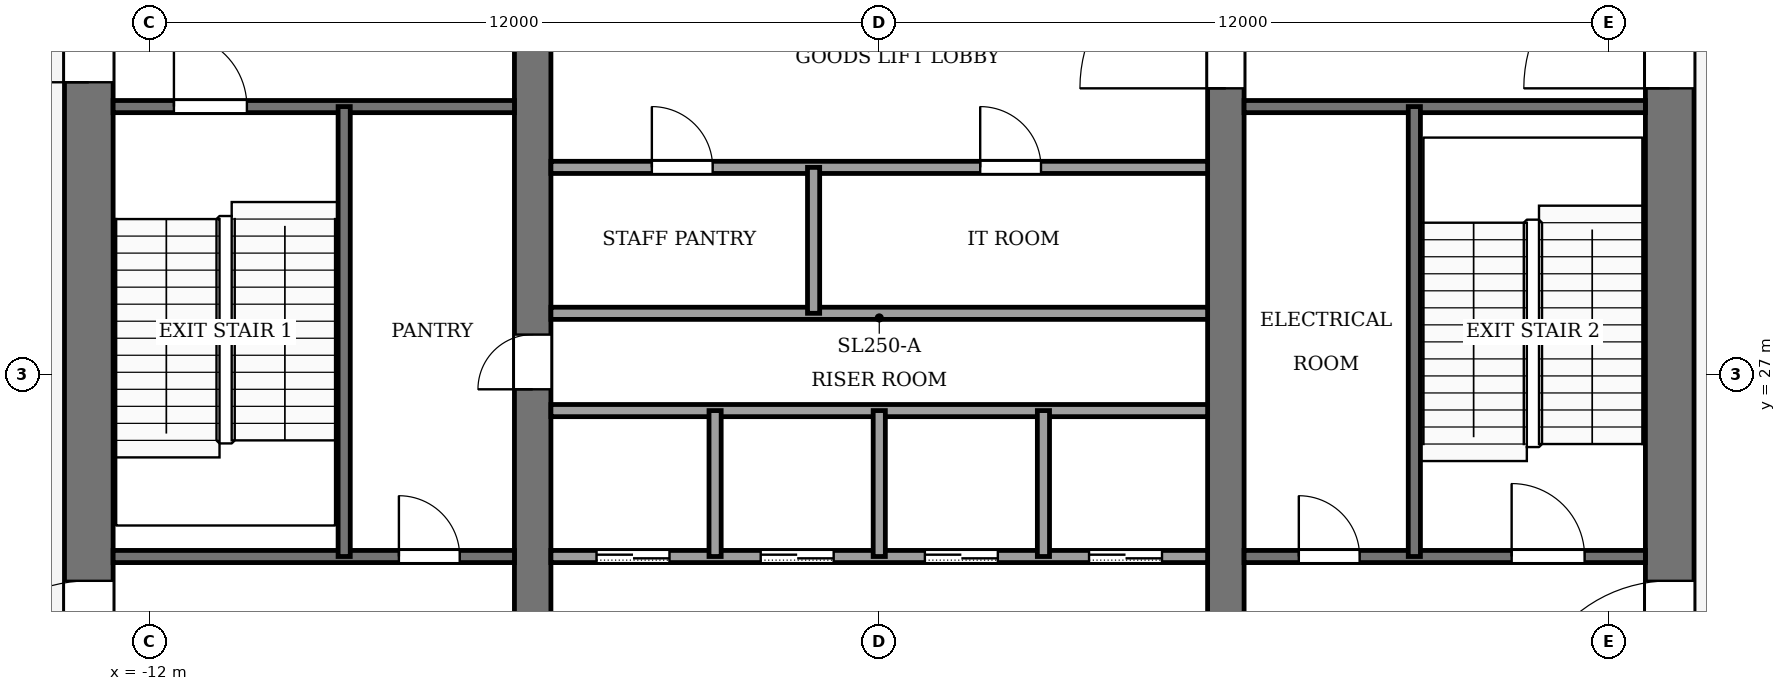
"""IFC4 building model, lengths in metres.
Left out: names, types, materials, properties, quantities, classifications, styles, units other than length and angle.
Written with IfcOpenShell. Run it as: python <this file> out.ifc"""

import sys

from ifc_helpers import new_model, si_unit, direction, frame, frame_2d, origin, place, context, subcontext, project, spatial, rectangle, extrude, element, fill, save


model = new_model("IFC4")
c1 = context("Model", 3, precision=1e-05, world=origin(), true_north=direction((0.0, 1.0)))
c2 = subcontext(c1, "Body", "Model", "MODEL_VIEW")
j1 = project(units=[si_unit("LENGTHUNIT", "METRE"), si_unit("PLANEANGLEUNIT", "RADIAN")], contexts=[c1])
p1 = place(None, origin())
s1 = spatial("IfcSite", under=j1, at=p1, CompositionType="ELEMENT")
p2 = place(p1, origin())
s2 = spatial("IfcBuilding", under=s1, at=p2, CompositionType="ELEMENT")
p3 = place(p2, frame((0.0, 0.0, 233.0)))
s3 = spatial("IfcBuildingStorey", under=s2, at=p3, CompositionType="ELEMENT", Elevation=233.0)
p4 = place(p3, frame((-13.0, 18.4, -0.13), z_axis=(0.0, 0.0, 1.0), x_axis=(0.0, 1.0, 0.0)))
e1 = element("IfcWall", 1, at=p4, inside=s3, PredefinedType="SHEAR", context=c2, shape_type="SweptSolid", body=[
    extrude(rectangle(XDim=19.2, YDim=0.8, at=frame_2d((9.6, 0.0))), origin(), (0.0, 0.0, 1.0), 5.0),
])
p5 = place(p4, frame((2.8, 0.0, 0.13)))
e2 = element("IfcOpeningElement", 2, at=p5, cuts=e1, PredefinedType="OPENING", context=c2, shape_type="SweptSolid", body=[
    extrude(rectangle(XDim=2.4, YDim=2.4, at=frame_2d((1.2, 1.2))), frame((0.0, 0.41, 0.0), z_axis=(0.0, -1.0, 0.0), x_axis=(1.0, 0.0, 0.0)), (0.0, 0.0, 1.0), 0.82),
])
p6 = place(p4, frame((13.4, 0.0, 0.13)))
e3 = element("IfcOpeningElement", 3, at=p6, cuts=e1, PredefinedType="OPENING", context=c2, shape_type="SweptSolid", body=[
    extrude(rectangle(XDim=1.4, YDim=2.2, at=frame_2d((0.7, 1.1))), frame((0.0, 0.41, 0.0), z_axis=(0.0, -1.0, 0.0), x_axis=(1.0, 0.0, 0.0)), (0.0, 0.0, 1.0), 0.82),
])
p7 = place(p3, frame((13.0, 18.4, -0.13), z_axis=(0.0, 0.0, 1.0), x_axis=(0.0, 1.0, 0.0)))
e4 = element("IfcWall", 4, at=p7, inside=s3, PredefinedType="SHEAR", context=c2, shape_type="SweptSolid", body=[
    extrude(rectangle(XDim=19.2, YDim=0.8, at=frame_2d((9.6, 0.0))), origin(), (0.0, 0.0, 1.0), 5.0),
])
p8 = place(p7, frame((2.8, 0.0, 0.13)))
e5 = element("IfcOpeningElement", 5, at=p8, cuts=e4, PredefinedType="OPENING", context=c2, shape_type="SweptSolid", body=[
    extrude(rectangle(XDim=2.4, YDim=2.4, at=frame_2d((1.2, 1.2))), frame((0.0, 0.41, 0.0), z_axis=(0.0, -1.0, 0.0), x_axis=(1.0, 0.0, 0.0)), (0.0, 0.0, 1.0), 0.82),
])
p9 = place(p7, frame((13.3, 0.0, 0.13)))
e6 = element("IfcOpeningElement", 6, at=p9, cuts=e4, PredefinedType="OPENING", context=c2, shape_type="SweptSolid", body=[
    extrude(rectangle(XDim=2.4, YDim=2.4, at=frame_2d((1.2, 1.2))), frame((0.0, 0.41, 0.0), z_axis=(0.0, -1.0, 0.0), x_axis=(1.0, 0.0, 0.0)), (0.0, 0.0, 1.0), 0.82),
])
p10 = place(p3, frame((-5.7, 18.4, -0.13), z_axis=(0.0, 0.0, 1.0), x_axis=(0.0, 1.0, 0.0)))
e7 = element("IfcWall", 7, at=p10, inside=s3, PredefinedType="SHEAR", context=c2, shape_type="SweptSolid", body=[
    extrude(rectangle(XDim=19.2, YDim=0.6, at=frame_2d((9.6, 0.0))), origin(), (0.0, 0.0, 1.0), 5.0),
])
p11 = place(p10, frame((8.35, 0.0, 0.13)))
e8 = element("IfcOpeningElement", 8, at=p11, cuts=e7, PredefinedType="OPENING", context=c2, shape_type="SweptSolid", body=[
    extrude(rectangle(XDim=0.9, YDim=2.1, at=frame_2d((0.45, 1.05))), frame((0.0, 0.31, 0.0), z_axis=(0.0, -1.0, 0.0), x_axis=(1.0, 0.0, 0.0)), (0.0, 0.0, 1.0), 0.62),
])
p12 = place(p3, frame((5.7, 18.4, -0.13), z_axis=(0.0, 0.0, 1.0), x_axis=(0.0, 1.0, 0.0)))
e9 = element("IfcWall", 9, at=p12, inside=s3, PredefinedType="SHEAR", context=c2, shape_type="SweptSolid", body=[
    extrude(rectangle(XDim=19.2, YDim=0.6, at=frame_2d((9.6, 0.0))), origin(), (0.0, 0.0, 1.0), 5.0),
])
p13 = place(p12, frame((13.3, 0.0, 0.13)))
e10 = element("IfcOpeningElement", 10, at=p13, cuts=e9, PredefinedType="OPENING", context=c2, shape_type="SweptSolid", body=[
    extrude(rectangle(XDim=2.4, YDim=2.4, at=frame_2d((1.2, 1.2))), frame((0.0, 0.31, 0.0), z_axis=(0.0, -1.0, 0.0), x_axis=(1.0, 0.0, 0.0)), (0.0, 0.0, 1.0), 0.62),
])
p14 = place(p3, frame((-12.6, 24.0, 0.0), z_axis=(0.0, 0.0, 1.0), x_axis=(1.0, 0.0, 0.0)))
e11 = element("IfcWall", 11, at=p14, inside=s3, PredefinedType="PARTITIONING", context=c2, shape_type="SweptSolid", body=[
    extrude(rectangle(XDim=6.6, YDim=0.2, at=frame_2d((3.3, 0.0))), origin(), (0.0, 0.0, 1.0), 4.87),
])
p15 = place(p14, frame((4.7, 0.0, 0.0)))
e12 = element("IfcOpeningElement", 12, at=p15, cuts=e11, PredefinedType="OPENING", context=c2, shape_type="SweptSolid", body=[
    extrude(rectangle(XDim=1.0, YDim=2.1, at=frame_2d((0.5, 1.05))), frame((0.0, 0.11, 0.0), z_axis=(0.0, -1.0, 0.0), x_axis=(1.0, 0.0, 0.0)), (0.0, 0.0, 1.0), 0.22),
])
p16 = place(p3, frame((-5.4, 24.0, 0.0), z_axis=(0.0, 0.0, 1.0), x_axis=(1.0, 0.0, 0.0)))
e13 = element("IfcWall", 13, at=p16, inside=s3, PredefinedType="PARTITIONING", context=c2, shape_type="SweptSolid", body=[
    extrude(rectangle(XDim=10.8, YDim=0.2, at=frame_2d((5.4, 0.0))), origin(), (0.0, 0.0, 1.0), 4.87),
])
p17 = place(p16, frame((0.75, 0.0, 0.0)))
e14 = element("IfcOpeningElement", 14, at=p17, cuts=e13, PredefinedType="OPENING", context=c2, shape_type="SweptSolid", body=[
    extrude(rectangle(XDim=1.2, YDim=2.2, at=frame_2d((0.6, 1.1))), frame((0.0, 0.11, 0.0), z_axis=(0.0, -1.0, 0.0), x_axis=(1.0, 0.0, 0.0)), (0.0, 0.0, 1.0), 0.22),
])
p18 = place(p16, frame((3.45, 0.0, 0.0)))
e15 = element("IfcOpeningElement", 15, at=p18, cuts=e13, PredefinedType="OPENING", context=c2, shape_type="SweptSolid", body=[
    extrude(rectangle(XDim=1.2, YDim=2.2, at=frame_2d((0.6, 1.1))), frame((0.0, 0.11, 0.0), z_axis=(0.0, -1.0, 0.0), x_axis=(1.0, 0.0, 0.0)), (0.0, 0.0, 1.0), 0.22),
])
p19 = place(p16, frame((6.15, 0.0, 0.0)))
e16 = element("IfcOpeningElement", 16, at=p19, cuts=e13, PredefinedType="OPENING", context=c2, shape_type="SweptSolid", body=[
    extrude(rectangle(XDim=1.2, YDim=2.2, at=frame_2d((0.6, 1.1))), frame((0.0, 0.11, 0.0), z_axis=(0.0, -1.0, 0.0), x_axis=(1.0, 0.0, 0.0)), (0.0, 0.0, 1.0), 0.22),
])
p20 = place(p16, frame((8.85, 0.0, 0.0)))
e17 = element("IfcOpeningElement", 17, at=p20, cuts=e13, PredefinedType="OPENING", context=c2, shape_type="SweptSolid", body=[
    extrude(rectangle(XDim=1.2, YDim=2.2, at=frame_2d((0.6, 1.1))), frame((0.0, 0.11, 0.0), z_axis=(0.0, -1.0, 0.0), x_axis=(1.0, 0.0, 0.0)), (0.0, 0.0, 1.0), 0.22),
])
p21 = place(p3, frame((6.0, 24.0, 0.0), z_axis=(0.0, 0.0, 1.0), x_axis=(1.0, 0.0, 0.0)))
e18 = element("IfcWall", 18, at=p21, inside=s3, PredefinedType="PARTITIONING", context=c2, shape_type="SweptSolid", body=[
    extrude(rectangle(XDim=6.6, YDim=0.2, at=frame_2d((3.3, 0.0))), origin(), (0.0, 0.0, 1.0), 4.87),
])
p22 = place(p21, frame((0.9, 0.0, 0.0)))
e19 = element("IfcOpeningElement", 19, at=p22, cuts=e18, PredefinedType="OPENING", context=c2, shape_type="SweptSolid", body=[
    extrude(rectangle(XDim=1.0, YDim=2.1, at=frame_2d((0.5, 1.05))), frame((0.0, 0.11, 0.0), z_axis=(0.0, -1.0, 0.0), x_axis=(1.0, 0.0, 0.0)), (0.0, 0.0, 1.0), 0.22),
])
p23 = place(p21, frame((4.4, 0.0, 0.0)))
e20 = element("IfcOpeningElement", 20, at=p23, cuts=e18, PredefinedType="OPENING", context=c2, shape_type="SweptSolid", body=[
    extrude(rectangle(XDim=1.2, YDim=2.2, at=frame_2d((0.6, 1.1))), frame((0.0, 0.11, 0.0), z_axis=(0.0, -1.0, 0.0), x_axis=(1.0, 0.0, 0.0)), (0.0, 0.0, 1.0), 0.22),
])
for number, where, z_axis, x_axis in (
    (21, (-5.4, 26.4, 0.0), (0.0, 0.0, 1.0), (1.0, 0.0, 0.0)),
    (22, (-5.4, 28.0, 0.0), (0.0, 0.0, 1.0), (1.0, 0.0, 0.0)),
):
    element("IfcWall", number, at=place(p3, frame(where, z_axis=z_axis, x_axis=x_axis)), inside=s3, PredefinedType="PARTITIONING", context=c2, shape_type="SweptSolid", body=[
        extrude(rectangle(XDim=10.8, YDim=0.2, at=frame_2d((5.4, 0.0))), origin(), (0.0, 0.0, 1.0), 4.87),
    ])
p24 = place(p3, frame((-5.4, 30.4, 0.0), z_axis=(0.0, 0.0, 1.0), x_axis=(1.0, 0.0, 0.0)))
e23 = element("IfcWall", 23, at=p24, inside=s3, PredefinedType="PARTITIONING", context=c2, shape_type="SweptSolid", body=[
    extrude(rectangle(XDim=10.8, YDim=0.2, at=frame_2d((5.4, 0.0))), origin(), (0.0, 0.0, 1.0), 4.87),
])
p25 = place(p24, frame((1.66, 0.0, 0.0)))
e24 = element("IfcOpeningElement", 24, at=p25, cuts=e23, PredefinedType="OPENING", context=c2, shape_type="SweptSolid", body=[
    extrude(rectangle(XDim=1.0, YDim=2.1, at=frame_2d((0.5, 1.05))), frame((0.0, 0.11, 0.0), z_axis=(0.0, -1.0, 0.0), x_axis=(1.0, 0.0, 0.0)), (0.0, 0.0, 1.0), 0.22),
])
p26 = place(p24, frame((7.06, 0.0, 0.0)))
e25 = element("IfcOpeningElement", 25, at=p26, cuts=e23, PredefinedType="OPENING", context=c2, shape_type="SweptSolid", body=[
    extrude(rectangle(XDim=1.0, YDim=2.1, at=frame_2d((0.5, 1.05))), frame((0.0, 0.11, 0.0), z_axis=(0.0, -1.0, 0.0), x_axis=(1.0, 0.0, 0.0)), (0.0, 0.0, 1.0), 0.22),
])
p27 = place(p3, frame((-12.6, 31.4, 0.0), z_axis=(0.0, 0.0, 1.0), x_axis=(1.0, 0.0, 0.0)))
e26 = element("IfcWall", 26, at=p27, inside=s3, PredefinedType="PARTITIONING", context=c2, shape_type="SweptSolid", body=[
    extrude(rectangle(XDim=6.6, YDim=0.2, at=frame_2d((3.3, 0.0))), origin(), (0.0, 0.0, 1.0), 4.87),
])
p28 = place(p27, frame((1.0, 0.0, 0.0)))
e27 = element("IfcOpeningElement", 27, at=p28, cuts=e26, PredefinedType="OPENING", context=c2, shape_type="SweptSolid", body=[
    extrude(rectangle(XDim=1.2, YDim=2.2, at=frame_2d((0.6, 1.1))), frame((0.0, 0.11, 0.0), z_axis=(0.0, -1.0, 0.0), x_axis=(1.0, 0.0, 0.0)), (0.0, 0.0, 1.0), 0.22),
])
p29 = place(p3, frame((6.0, 31.4, 0.0), z_axis=(0.0, 0.0, 1.0), x_axis=(1.0, 0.0, 0.0)))
e28 = element("IfcWall", 28, at=p29, inside=s3, PredefinedType="PARTITIONING", context=c2, shape_type="SweptSolid", body=[
    extrude(rectangle(XDim=6.6, YDim=0.2, at=frame_2d((3.3, 0.0))), origin(), (0.0, 0.0, 1.0), 4.87),
])
p30 = place(p3, frame((-8.8, 24.0, 0.0), z_axis=(0.0, 0.0, 1.0), x_axis=(0.0, 1.0, 0.0)))
e29 = element("IfcWall", 29, at=p30, inside=s3, PredefinedType="PARTITIONING", context=c2, shape_type="SweptSolid", body=[
    extrude(rectangle(XDim=7.4, YDim=0.2, at=frame_2d((3.7, 0.0))), origin(), (0.0, 0.0, 1.0), 4.87),
])
for number, where, z_axis, x_axis in (
    (30, (-2.7, 24.0, 0.0), (0.0, 0.0, 1.0), (0.0, 1.0, 0.0)),
    (31, (-1.08, 28.0, 0.0), (0.0, 0.0, 1.0), (0.0, 1.0, 0.0)),
    (32, (0.0, 24.0, 0.0), (0.0, 0.0, 1.0), (0.0, 1.0, 0.0)),
    (33, (2.7, 24.0, 0.0), (0.0, 0.0, 1.0), (0.0, 1.0, 0.0)),
):
    element("IfcWall", number, at=place(p3, frame(where, z_axis=z_axis, x_axis=x_axis)), inside=s3, PredefinedType="PARTITIONING", context=c2, shape_type="SweptSolid", body=[
        extrude(rectangle(XDim=2.4, YDim=0.2, at=frame_2d((1.2, 0.0))), origin(), (0.0, 0.0, 1.0), 4.87),
    ])
p31 = place(p3, frame((8.8, 24.0, 0.0), z_axis=(0.0, 0.0, 1.0), x_axis=(0.0, 1.0, 0.0)))
e34 = element("IfcWall", 34, at=p31, inside=s3, PredefinedType="PARTITIONING", context=c2, shape_type="SweptSolid", body=[
    extrude(rectangle(XDim=7.4, YDim=0.2, at=frame_2d((3.7, 0.0))), origin(), (0.0, 0.0, 1.0), 4.87),
])
p32 = place(p17, origin())
e35 = element("IfcDoor", 35, at=p32, inside=s3, OperationType="SLIDING_TO_LEFT", PredefinedType="DOOR", context=c2, shape_type="SweptSolid", body=[
    extrude(rectangle(XDim=1.2, YDim=2.2, at=frame_2d((0.6, 1.1))), frame((0.0, 0.025, 0.0), z_axis=(0.0, -1.0, 0.0), x_axis=(1.0, 0.0, 0.0)), (0.0, 0.0, 1.0), 0.05),
])
fill(e14, e35)
p33 = place(p18, origin())
e36 = element("IfcDoor", 36, at=p33, inside=s3, OperationType="SLIDING_TO_LEFT", PredefinedType="DOOR", context=c2, shape_type="SweptSolid", body=[
    extrude(rectangle(XDim=1.2, YDim=2.2, at=frame_2d((0.6, 1.1))), frame((0.0, 0.025, 0.0), z_axis=(0.0, -1.0, 0.0), x_axis=(1.0, 0.0, 0.0)), (0.0, 0.0, 1.0), 0.05),
])
fill(e15, e36)
p34 = place(p19, origin())
e37 = element("IfcDoor", 37, at=p34, inside=s3, OperationType="SLIDING_TO_LEFT", PredefinedType="DOOR", context=c2, shape_type="SweptSolid", body=[
    extrude(rectangle(XDim=1.2, YDim=2.2, at=frame_2d((0.6, 1.1))), frame((0.0, 0.025, 0.0), z_axis=(0.0, -1.0, 0.0), x_axis=(1.0, 0.0, 0.0)), (0.0, 0.0, 1.0), 0.05),
])
fill(e16, e37)
p35 = place(p20, origin())
e38 = element("IfcDoor", 38, at=p35, inside=s3, OperationType="SLIDING_TO_LEFT", PredefinedType="DOOR", context=c2, shape_type="SweptSolid", body=[
    extrude(rectangle(XDim=1.2, YDim=2.2, at=frame_2d((0.6, 1.1))), frame((0.0, 0.025, 0.0), z_axis=(0.0, -1.0, 0.0), x_axis=(1.0, 0.0, 0.0)), (0.0, 0.0, 1.0), 0.05),
])
fill(e17, e38)
p36 = place(p25, origin())
e39 = element("IfcDoor", 39, at=p36, inside=s3, OperationType="SINGLE_SWING_RIGHT", PredefinedType="DOOR", context=c2, shape_type="SweptSolid", body=[
    extrude(rectangle(XDim=1.0, YDim=2.1, at=frame_2d((0.5, 1.05))), frame((0.0, 0.025, 0.0), z_axis=(0.0, -1.0, 0.0), x_axis=(1.0, 0.0, 0.0)), (0.0, 0.0, 1.0), 0.05),
])
fill(e24, e39)
p37 = place(p26, origin())
e40 = element("IfcDoor", 40, at=p37, inside=s3, OperationType="SINGLE_SWING_LEFT", PredefinedType="DOOR", context=c2, shape_type="SweptSolid", body=[
    extrude(rectangle(XDim=1.0, YDim=2.1, at=frame_2d((0.5, 1.05))), frame((0.0, 0.025, 0.0), z_axis=(0.0, -1.0, 0.0), x_axis=(1.0, 0.0, 0.0)), (0.0, 0.0, 1.0), 0.05),
])
fill(e25, e40)
p38 = place(p15, origin())
e41 = element("IfcDoor", 41, at=p38, inside=s3, OperationType="SINGLE_SWING_RIGHT", PredefinedType="DOOR", context=c2, shape_type="SweptSolid", body=[
    extrude(rectangle(XDim=1.0, YDim=2.1, at=frame_2d((0.5, 1.05))), frame((0.0, 0.025, 0.0), z_axis=(0.0, -1.0, 0.0), x_axis=(1.0, 0.0, 0.0)), (0.0, 0.0, 1.0), 0.05),
])
fill(e12, e41)
p39 = place(p22, origin())
e42 = element("IfcDoor", 42, at=p39, inside=s3, OperationType="SINGLE_SWING_LEFT", PredefinedType="DOOR", context=c2, shape_type="SweptSolid", body=[
    extrude(rectangle(XDim=1.0, YDim=2.1, at=frame_2d((0.5, 1.05))), frame((0.0, 0.025, 0.0), z_axis=(0.0, -1.0, 0.0), x_axis=(1.0, 0.0, 0.0)), (0.0, 0.0, 1.0), 0.05),
])
fill(e19, e42)
p40 = place(p11, origin())
e43 = element("IfcDoor", 43, at=p40, inside=s3, OperationType="SINGLE_SWING_RIGHT", PredefinedType="DOOR", context=c2, shape_type="SweptSolid", body=[
    extrude(rectangle(XDim=0.9, YDim=2.1, at=frame_2d((0.45, 1.05))), frame((0.0, 0.025, 0.0), z_axis=(0.0, -1.0, 0.0), x_axis=(1.0, 0.0, 0.0)), (0.0, 0.0, 1.0), 0.05),
])
fill(e8, e43)
p41 = place(p28, origin())
e44 = element("IfcDoor", 44, at=p41, inside=s3, OperationType="SINGLE_SWING_RIGHT", PredefinedType="DOOR", context=c2, shape_type="SweptSolid", body=[
    extrude(rectangle(XDim=1.2, YDim=2.2, at=frame_2d((0.6, 1.1))), frame((0.0, 0.025, 0.0), z_axis=(0.0, -1.0, 0.0), x_axis=(1.0, 0.0, 0.0)), (0.0, 0.0, 1.0), 0.05),
])
fill(e27, e44)
p42 = place(p23, origin())
e45 = element("IfcDoor", 45, at=p42, inside=s3, OperationType="SINGLE_SWING_LEFT", PredefinedType="DOOR", context=c2, shape_type="SweptSolid", body=[
    extrude(rectangle(XDim=1.2, YDim=2.2, at=frame_2d((0.6, 1.1))), frame((0.0, 0.025, 0.0), z_axis=(0.0, -1.0, 0.0), x_axis=(1.0, 0.0, 0.0)), (0.0, 0.0, 1.0), 0.05),
])
fill(e20, e45)
p43 = place(p13, origin())
e46 = element("IfcDoor", 46, at=p43, inside=s3, OperationType="DOUBLE_DOOR_SINGLE_SWING", PredefinedType="DOOR", context=c2, shape_type="SweptSolid", body=[
    extrude(rectangle(XDim=2.4, YDim=2.4, at=frame_2d((1.2, 1.2))), frame((0.0, 0.025, 0.0), z_axis=(0.0, -1.0, 0.0), x_axis=(1.0, 0.0, 0.0)), (0.0, 0.0, 1.0), 0.05),
])
fill(e10, e46)
p44 = place(p5, origin())
e47 = element("IfcDoor", 47, at=p44, inside=s3, OperationType="DOUBLE_DOOR_SINGLE_SWING", PredefinedType="DOOR", context=c2, shape_type="SweptSolid", body=[
    extrude(rectangle(XDim=2.4, YDim=2.4, at=frame_2d((1.2, 1.2))), frame((0.0, 0.025, 0.0), z_axis=(0.0, -1.0, 0.0), x_axis=(1.0, 0.0, 0.0)), (0.0, 0.0, 1.0), 0.05),
])
fill(e2, e47)
p45 = place(p8, origin())
e48 = element("IfcDoor", 48, at=p45, inside=s3, OperationType="DOUBLE_DOOR_SINGLE_SWING", PredefinedType="DOOR", context=c2, shape_type="SweptSolid", body=[
    extrude(rectangle(XDim=2.4, YDim=2.4, at=frame_2d((1.2, 1.2))), frame((0.0, 0.025, 0.0), z_axis=(0.0, -1.0, 0.0), x_axis=(1.0, 0.0, 0.0)), (0.0, 0.0, 1.0), 0.05),
])
fill(e5, e48)
p46 = place(p9, origin())
e49 = element("IfcDoor", 49, at=p46, inside=s3, OperationType="DOUBLE_DOOR_SINGLE_SWING", PredefinedType="DOOR", context=c2, shape_type="SweptSolid", body=[
    extrude(rectangle(XDim=2.4, YDim=2.4, at=frame_2d((1.2, 1.2))), frame((0.0, 0.025, 0.0), z_axis=(0.0, -1.0, 0.0), x_axis=(1.0, 0.0, 0.0)), (0.0, 0.0, 1.0), 0.05),
])
fill(e6, e49)
p47 = place(p6, origin())
e50 = element("IfcDoor", 50, at=p47, inside=s3, OperationType="SINGLE_SWING_RIGHT", PredefinedType="DOOR", context=c2, shape_type="SweptSolid", body=[
    extrude(rectangle(XDim=1.4, YDim=2.2, at=frame_2d((0.7, 1.1))), frame((0.0, 0.025, 0.0), z_axis=(0.0, -1.0, 0.0), x_axis=(1.0, 0.0, 0.0)), (0.0, 0.0, 1.0), 0.05),
])
fill(e3, e50)
save(model, sys.argv[1])
